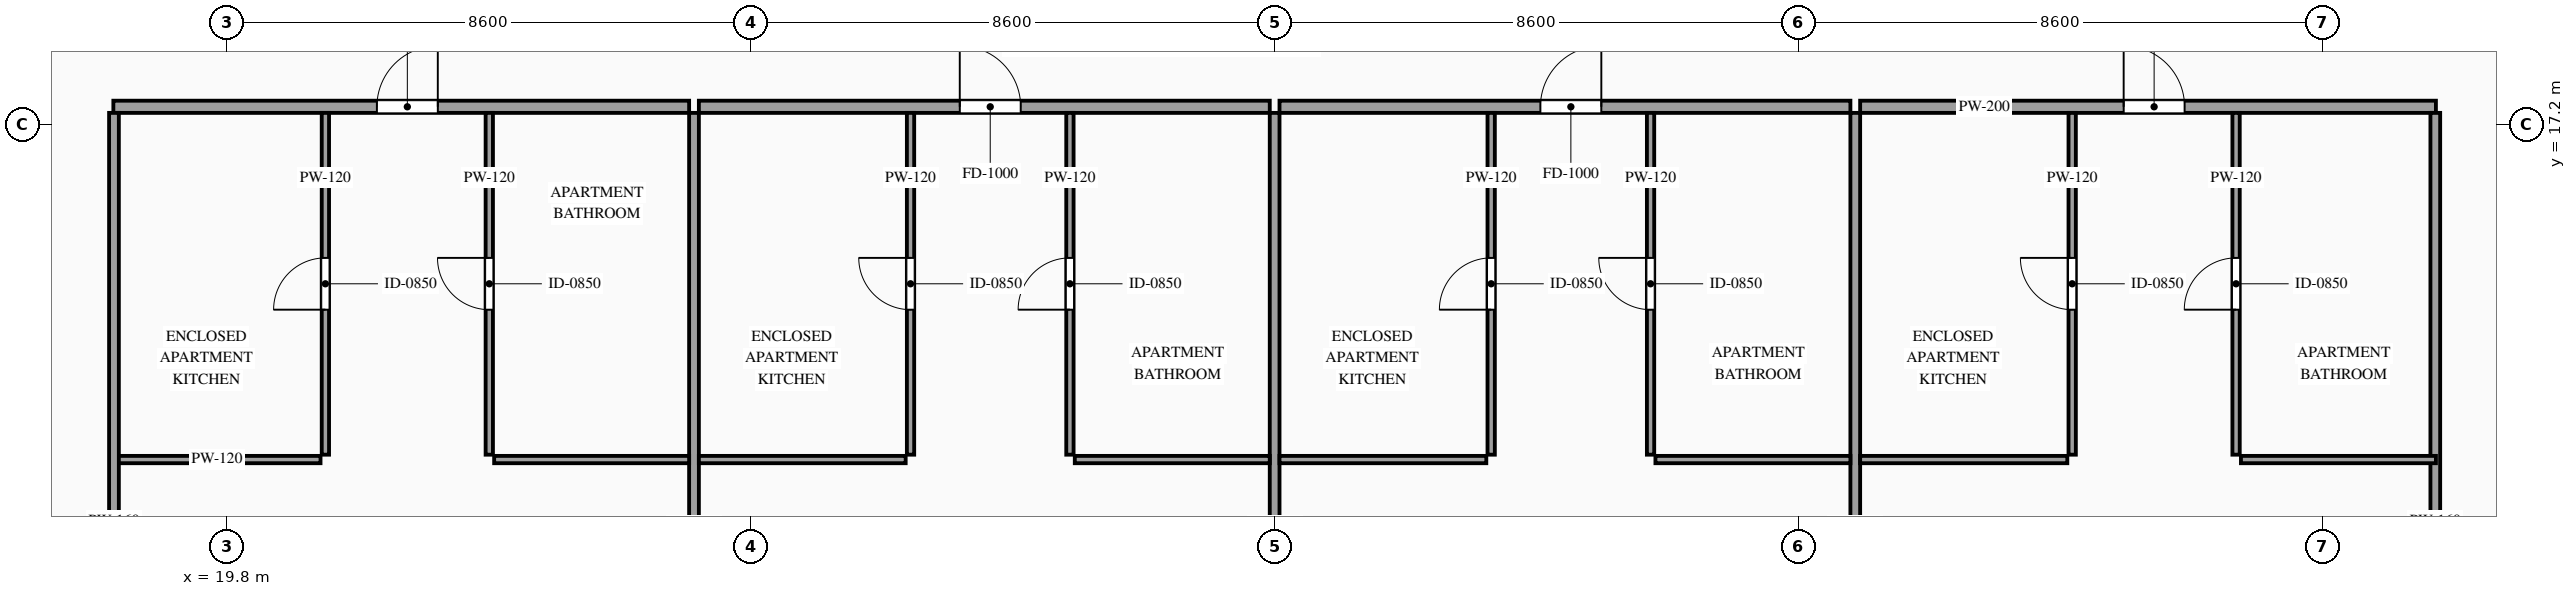
"""IFC4 building model, lengths in metres.
Left out: names, types, materials, properties, quantities, classifications, styles, units other than length and angle.
Written with IfcOpenShell. Run it as: python <this file> out.ifc"""

import sys

from ifc_helpers import new_model, si_unit, direction, frame, frame_2d, origin, place, context, subcontext, project, spatial, rectangle, extrude, source, transform, mapped, element, fill, save


model = new_model("IFC4")
c1 = context("Model", 3, precision=1e-05, world=origin(), true_north=direction((0.0, 1.0)))
c2 = subcontext(c1, "Body", "Model", "MODEL_VIEW")
j1 = project(units=[si_unit("LENGTHUNIT", "METRE"), si_unit("PLANEANGLEUNIT", "RADIAN")], contexts=[c1])
p1 = place(None, origin())
s1 = spatial("IfcSite", under=j1, at=p1, CompositionType="ELEMENT")
p2 = place(p1, origin())
s2 = spatial("IfcBuilding", under=s1, at=p2, CompositionType="ELEMENT")
p3 = place(p2, frame((0.0, 0.0, 188.0)))
s3 = spatial("IfcBuildingStorey", under=s2, at=p3, CompositionType="ELEMENT", Elevation=188.0)
p4 = place(p3, frame((17.94, 17.49, 0.0), z_axis=(0.0, 0.0, 1.0), x_axis=(1.0, 0.0, 0.0)))
e1 = element("IfcWall", 1, at=p4, inside=s3, PredefinedType="PARTITIONING", context=c2, shape_type="SweptSolid", body=[
    extrude(rectangle(XDim=9.45, YDim=0.2, at=frame_2d((4.725, 0.0))), origin(), (0.0, 0.0, 1.0), 3.28),
])
p5 = place(p4, frame((4.325, 0.0, 0.0)))
e2 = element("IfcOpeningElement", 2, at=p5, cuts=e1, PredefinedType="OPENING", context=c2, shape_type="SweptSolid", body=[
    extrude(rectangle(XDim=1.0, YDim=2.2, at=frame_2d((0.5, 1.1))), frame((0.0, 0.115, 0.0), z_axis=(0.0, -1.0, 0.0), x_axis=(1.0, 0.0, 0.0)), (0.0, 0.0, 1.0), 0.23),
])
m1 = source(origin(), c2, "Body", "SweptSolid", [
    extrude(rectangle(XDim=13.54, YDim=0.16, at=frame_2d((6.77, 0.0))), origin(), (0.0, 0.0, 1.0), 3.28),
])
p6 = place(p3, frame((27.47, 3.85, 0.0), z_axis=(0.0, 0.0, 1.0), x_axis=(0.0, 1.0, 0.0)))
e3 = element("IfcWall", 3, at=p6, inside=s3, PredefinedType="PARTITIONING", context=c2, shape_type="MappedRepresentation", body=[
    mapped(m1, transform((0.0, 0.0, 0.0), scale=1.0)),
])
m2 = source(origin(), c2, "Body", "SweptSolid", [
    extrude(rectangle(XDim=3.4, YDim=0.12, at=frame_2d((1.7, 0.0))), origin(), (0.0, 0.0, 1.0), 3.28),
])
p7 = place(p3, frame((17.94, 11.7, 0.0), z_axis=(0.0, 0.0, 1.0), x_axis=(1.0, 0.0, 0.0)))
e4 = element("IfcWall", 4, at=p7, inside=s3, PredefinedType="PARTITIONING", context=c2, shape_type="MappedRepresentation", body=[
    mapped(m2, transform((0.0, 0.0, 0.0), scale=1.0)),
])
p8 = place(p3, frame((21.42, 11.78, 0.0), z_axis=(0.0, 0.0, 1.0), x_axis=(0.0, 1.0, 0.0)))
e5 = element("IfcWall", 5, at=p8, inside=s3, PredefinedType="PARTITIONING", context=c2, shape_type="SweptSolid", body=[
    extrude(rectangle(XDim=5.61, YDim=0.12, at=frame_2d((2.805, 0.0))), origin(), (0.0, 0.0, 1.0), 3.28),
])
p9 = place(p8, frame((2.38, 0.0, 0.0)))
e6 = element("IfcOpeningElement", 6, at=p9, cuts=e5, PredefinedType="OPENING", context=c2, shape_type="SweptSolid", body=[
    extrude(rectangle(XDim=0.85, YDim=2.1, at=frame_2d((0.425, 1.05))), frame((0.0, 0.075, 0.0), z_axis=(0.0, -1.0, 0.0), x_axis=(1.0, 0.0, 0.0)), (0.0, 0.0, 1.0), 0.15),
])
m3 = source(origin(), c2, "Body", "SweptSolid", [
    extrude(rectangle(XDim=3.2, YDim=0.12, at=frame_2d((1.6, 0.0))), origin(), (0.0, 0.0, 1.0), 2.875),
])
p10 = place(p3, frame((24.19, 11.7, 0.0), z_axis=(0.0, 0.0, 1.0), x_axis=(1.0, 0.0, 0.0)))
e7 = element("IfcWall", 7, at=p10, inside=s3, PredefinedType="PARTITIONING", context=c2, shape_type="MappedRepresentation", body=[
    mapped(m3, transform((0.0, 0.0, 0.0), scale=1.0)),
])
p11 = place(p3, frame((24.11, 11.78, 0.0), z_axis=(0.0, 0.0, 1.0), x_axis=(0.0, 1.0, 0.0)))
e8 = element("IfcWall", 8, at=p11, inside=s3, PredefinedType="PARTITIONING", context=c2, shape_type="SweptSolid", body=[
    extrude(rectangle(XDim=5.61, YDim=0.12, at=frame_2d((2.805, 0.0))), origin(), (0.0, 0.0, 1.0), 3.28),
])
p12 = place(p11, frame((2.38, 0.0, 0.0)))
e9 = element("IfcOpeningElement", 9, at=p12, cuts=e8, PredefinedType="OPENING", context=c2, shape_type="SweptSolid", body=[
    extrude(rectangle(XDim=0.85, YDim=2.1, at=frame_2d((0.425, 1.05))), frame((0.0, 0.075, 0.0), z_axis=(0.0, -1.0, 0.0), x_axis=(1.0, 0.0, 0.0)), (0.0, 0.0, 1.0), 0.15),
])
p13 = place(p3, frame((27.55, 17.49, 0.0), z_axis=(0.0, 0.0, 1.0), x_axis=(1.0, 0.0, 0.0)))
e10 = element("IfcWall", 10, at=p13, inside=s3, PredefinedType="PARTITIONING", context=c2, shape_type="SweptSolid", body=[
    extrude(rectangle(XDim=9.37, YDim=0.2, at=frame_2d((4.685, 0.0))), origin(), (0.0, 0.0, 1.0), 3.28),
])
p14 = place(p13, frame((4.282, 0.0, 0.0)))
e11 = element("IfcOpeningElement", 11, at=p14, cuts=e10, PredefinedType="OPENING", context=c2, shape_type="SweptSolid", body=[
    extrude(rectangle(XDim=1.0, YDim=2.2, at=frame_2d((0.5, 1.1))), frame((0.0, 0.115, 0.0), z_axis=(0.0, -1.0, 0.0), x_axis=(1.0, 0.0, 0.0)), (0.0, 0.0, 1.0), 0.23),
])
m4 = source(origin(), c2, "Body", "SweptSolid", [
    extrude(rectangle(XDim=13.54, YDim=0.16, at=frame_2d((6.77, 0.0))), origin(), (0.0, 0.0, 1.0), 2.687),
])
p15 = place(p3, frame((37.0, 3.85, 0.0), z_axis=(0.0, 0.0, 1.0), x_axis=(0.0, 1.0, 0.0)))
e12 = element("IfcWall", 12, at=p15, inside=s3, PredefinedType="PARTITIONING", context=c2, shape_type="MappedRepresentation", body=[
    mapped(m4, transform((0.0, 0.0, 0.0), scale=1.0)),
])
m5 = source(origin(), c2, "Body", "SweptSolid", [
    extrude(rectangle(XDim=3.394, YDim=0.12, at=frame_2d((1.697, 0.0))), origin(), (0.0, 0.0, 1.0), 2.875),
])
p16 = place(p3, frame((27.55, 11.7, 0.0), z_axis=(0.0, 0.0, 1.0), x_axis=(1.0, 0.0, 0.0)))
e13 = element("IfcWall", 13, at=p16, inside=s3, PredefinedType="PARTITIONING", context=c2, shape_type="MappedRepresentation", body=[
    mapped(m5, transform((0.0, 0.0, 0.0), scale=1.0)),
])
p17 = place(p3, frame((31.024, 11.78, 0.0), z_axis=(0.0, 0.0, 1.0), x_axis=(0.0, 1.0, 0.0)))
e14 = element("IfcWall", 14, at=p17, inside=s3, PredefinedType="PARTITIONING", context=c2, shape_type="SweptSolid", body=[
    extrude(rectangle(XDim=5.61, YDim=0.12, at=frame_2d((2.805, 0.0))), origin(), (0.0, 0.0, 1.0), 3.28),
])
p18 = place(p17, frame((2.38, 0.0, 0.0)))
e15 = element("IfcOpeningElement", 15, at=p18, cuts=e14, PredefinedType="OPENING", context=c2, shape_type="SweptSolid", body=[
    extrude(rectangle(XDim=0.85, YDim=2.1, at=frame_2d((0.425, 1.05))), frame((0.0, 0.075, 0.0), z_axis=(0.0, -1.0, 0.0), x_axis=(1.0, 0.0, 0.0)), (0.0, 0.0, 1.0), 0.15),
])
p19 = place(p3, frame((33.72, 11.7, 0.0), z_axis=(0.0, 0.0, 1.0), x_axis=(1.0, 0.0, 0.0)))
e16 = element("IfcWall", 16, at=p19, inside=s3, PredefinedType="PARTITIONING", context=c2, shape_type="MappedRepresentation", body=[
    mapped(m3, transform((0.0, 0.0, 0.0), scale=1.0)),
])
p20 = place(p3, frame((33.64, 11.78, 0.0), z_axis=(0.0, 0.0, 1.0), x_axis=(0.0, 1.0, 0.0)))
e17 = element("IfcWall", 17, at=p20, inside=s3, PredefinedType="PARTITIONING", context=c2, shape_type="SweptSolid", body=[
    extrude(rectangle(XDim=5.61, YDim=0.12, at=frame_2d((2.805, 0.0))), origin(), (0.0, 0.0, 1.0), 3.28),
])
p21 = place(p20, frame((2.38, 0.0, 0.0)))
e18 = element("IfcOpeningElement", 18, at=p21, cuts=e17, PredefinedType="OPENING", context=c2, shape_type="SweptSolid", body=[
    extrude(rectangle(XDim=0.85, YDim=2.1, at=frame_2d((0.425, 1.05))), frame((0.0, 0.075, 0.0), z_axis=(0.0, -1.0, 0.0), x_axis=(1.0, 0.0, 0.0)), (0.0, 0.0, 1.0), 0.15),
])
p22 = place(p3, frame((37.08, 17.49, 0.0), z_axis=(0.0, 0.0, 1.0), x_axis=(1.0, 0.0, 0.0)))
e19 = element("IfcWall", 19, at=p22, inside=s3, PredefinedType="PARTITIONING", context=c2, shape_type="SweptSolid", body=[
    extrude(rectangle(XDim=9.37, YDim=0.2, at=frame_2d((4.685, 0.0))), origin(), (0.0, 0.0, 1.0), 3.28),
])
p23 = place(p22, frame((4.282, 0.0, 0.0)))
e20 = element("IfcOpeningElement", 20, at=p23, cuts=e19, PredefinedType="OPENING", context=c2, shape_type="SweptSolid", body=[
    extrude(rectangle(XDim=1.0, YDim=2.2, at=frame_2d((0.5, 1.1))), frame((0.0, 0.115, 0.0), z_axis=(0.0, -1.0, 0.0), x_axis=(1.0, 0.0, 0.0)), (0.0, 0.0, 1.0), 0.23),
])
p24 = place(p3, frame((46.53, 3.85, 0.0), z_axis=(0.0, 0.0, 1.0), x_axis=(0.0, 1.0, 0.0)))
e21 = element("IfcWall", 21, at=p24, inside=s3, PredefinedType="PARTITIONING", context=c2, shape_type="MappedRepresentation", body=[
    mapped(m1, transform((0.0, 0.0, 0.0), scale=1.0)),
])
p25 = place(p3, frame((37.08, 11.7, 0.0), z_axis=(0.0, 0.0, 1.0), x_axis=(1.0, 0.0, 0.0)))
e22 = element("IfcWall", 22, at=p25, inside=s3, PredefinedType="PARTITIONING", context=c2, shape_type="MappedRepresentation", body=[
    mapped(m5, transform((0.0, 0.0, 0.0), scale=1.0)),
])
p26 = place(p3, frame((40.554, 11.78, 0.0), z_axis=(0.0, 0.0, 1.0), x_axis=(0.0, 1.0, 0.0)))
e23 = element("IfcWall", 23, at=p26, inside=s3, PredefinedType="PARTITIONING", context=c2, shape_type="SweptSolid", body=[
    extrude(rectangle(XDim=5.61, YDim=0.12, at=frame_2d((2.805, 0.0))), origin(), (0.0, 0.0, 1.0), 3.28),
])
p27 = place(p26, frame((2.38, 0.0, 0.0)))
e24 = element("IfcOpeningElement", 24, at=p27, cuts=e23, PredefinedType="OPENING", context=c2, shape_type="SweptSolid", body=[
    extrude(rectangle(XDim=0.85, YDim=2.1, at=frame_2d((0.425, 1.05))), frame((0.0, 0.075, 0.0), z_axis=(0.0, -1.0, 0.0), x_axis=(1.0, 0.0, 0.0)), (0.0, 0.0, 1.0), 0.15),
])
p28 = place(p3, frame((43.25, 11.7, 0.0), z_axis=(0.0, 0.0, 1.0), x_axis=(1.0, 0.0, 0.0)))
e25 = element("IfcWall", 25, at=p28, inside=s3, PredefinedType="PARTITIONING", context=c2, shape_type="MappedRepresentation", body=[
    mapped(m3, transform((0.0, 0.0, 0.0), scale=1.0)),
])
p29 = place(p3, frame((43.17, 11.78, 0.0), z_axis=(0.0, 0.0, 1.0), x_axis=(0.0, 1.0, 0.0)))
e26 = element("IfcWall", 26, at=p29, inside=s3, PredefinedType="PARTITIONING", context=c2, shape_type="SweptSolid", body=[
    extrude(rectangle(XDim=5.61, YDim=0.12, at=frame_2d((2.805, 0.0))), origin(), (0.0, 0.0, 1.0), 3.28),
])
p30 = place(p29, frame((2.38, 0.0, 0.0)))
e27 = element("IfcOpeningElement", 27, at=p30, cuts=e26, PredefinedType="OPENING", context=c2, shape_type="SweptSolid", body=[
    extrude(rectangle(XDim=0.85, YDim=2.1, at=frame_2d((0.425, 1.05))), frame((0.0, 0.075, 0.0), z_axis=(0.0, -1.0, 0.0), x_axis=(1.0, 0.0, 0.0)), (0.0, 0.0, 1.0), 0.15),
])
p31 = place(p3, frame((46.61, 17.49, 0.0), z_axis=(0.0, 0.0, 1.0), x_axis=(1.0, 0.0, 0.0)))
e28 = element("IfcWall", 28, at=p31, inside=s3, PredefinedType="PARTITIONING", context=c2, shape_type="SweptSolid", body=[
    extrude(rectangle(XDim=9.45, YDim=0.2, at=frame_2d((4.725, 0.0))), origin(), (0.0, 0.0, 1.0), 3.28),
])
p32 = place(p31, frame((4.325, 0.0, 0.0)))
e29 = element("IfcOpeningElement", 29, at=p32, cuts=e28, PredefinedType="OPENING", context=c2, shape_type="SweptSolid", body=[
    extrude(rectangle(XDim=1.0, YDim=2.2, at=frame_2d((0.5, 1.1))), frame((0.0, 0.115, 0.0), z_axis=(0.0, -1.0, 0.0), x_axis=(1.0, 0.0, 0.0)), (0.0, 0.0, 1.0), 0.23),
])
m6 = source(origin(), c2, "Body", "SweptSolid", [
    extrude(rectangle(XDim=13.39, YDim=0.16, at=frame_2d((6.695, 0.0))), origin(), (0.0, 0.0, 1.0), 3.28),
])
for number, where, z_axis, x_axis in (
    (30, (17.95, 4.0, 0.0), (0.0, 0.0, 1.0), (0.0, 1.0, 0.0)),
    (31, (56.05, 4.0, 0.0), (0.0, 0.0, 1.0), (0.0, 1.0, 0.0)),
):
    element("IfcWall", number, at=place(p3, frame(where, z_axis=z_axis, x_axis=x_axis)), inside=s3, PredefinedType="PARTITIONING", context=c2, shape_type="MappedRepresentation", body=[
        mapped(m6, transform((0.0, 0.0, 0.0), scale=1.0)),
    ])
m7 = source(origin(), c2, "Body", "SweptSolid", [
    extrude(rectangle(XDim=3.4, YDim=0.12, at=frame_2d((1.7, 0.0))), origin(), (0.0, 0.0, 1.0), 2.875),
])
p33 = place(p3, frame((46.61, 11.7, 0.0), z_axis=(0.0, 0.0, 1.0), x_axis=(1.0, 0.0, 0.0)))
e32 = element("IfcWall", 32, at=p33, inside=s3, PredefinedType="PARTITIONING", context=c2, shape_type="MappedRepresentation", body=[
    mapped(m7, transform((0.0, 0.0, 0.0), scale=1.0)),
])
p34 = place(p3, frame((50.09, 11.78, 0.0), z_axis=(0.0, 0.0, 1.0), x_axis=(0.0, 1.0, 0.0)))
e33 = element("IfcWall", 33, at=p34, inside=s3, PredefinedType="PARTITIONING", context=c2, shape_type="SweptSolid", body=[
    extrude(rectangle(XDim=5.61, YDim=0.12, at=frame_2d((2.805, 0.0))), origin(), (0.0, 0.0, 1.0), 2.775),
])
p35 = place(p34, frame((2.38, 0.0, 0.0)))
e34 = element("IfcOpeningElement", 34, at=p35, cuts=e33, PredefinedType="OPENING", context=c2, shape_type="SweptSolid", body=[
    extrude(rectangle(XDim=0.85, YDim=2.1, at=frame_2d((0.425, 1.05))), frame((0.0, 0.075, 0.0), z_axis=(0.0, -1.0, 0.0), x_axis=(1.0, 0.0, 0.0)), (0.0, 0.0, 1.0), 0.15),
])
m8 = source(origin(), c2, "Body", "SweptSolid", [
    extrude(rectangle(XDim=3.2, YDim=0.12, at=frame_2d((1.6, 0.0))), origin(), (0.0, 0.0, 1.0), 3.28),
])
p36 = place(p3, frame((52.86, 11.7, 0.0), z_axis=(0.0, 0.0, 1.0), x_axis=(1.0, 0.0, 0.0)))
e35 = element("IfcWall", 35, at=p36, inside=s3, PredefinedType="PARTITIONING", context=c2, shape_type="MappedRepresentation", body=[
    mapped(m8, transform((0.0, 0.0, 0.0), scale=1.0)),
])
p37 = place(p3, frame((52.78, 11.78, 0.0), z_axis=(0.0, 0.0, 1.0), x_axis=(0.0, 1.0, 0.0)))
e36 = element("IfcWall", 36, at=p37, inside=s3, PredefinedType="PARTITIONING", context=c2, shape_type="SweptSolid", body=[
    extrude(rectangle(XDim=5.61, YDim=0.12, at=frame_2d((2.805, 0.0))), origin(), (0.0, 0.0, 1.0), 3.28),
])
p38 = place(p37, frame((2.38, 0.0, 0.0)))
e37 = element("IfcOpeningElement", 37, at=p38, cuts=e36, PredefinedType="OPENING", context=c2, shape_type="SweptSolid", body=[
    extrude(rectangle(XDim=0.85, YDim=2.1, at=frame_2d((0.425, 1.05))), frame((0.0, 0.075, 0.0), z_axis=(0.0, -1.0, 0.0), x_axis=(1.0, 0.0, 0.0)), (0.0, 0.0, 1.0), 0.15),
])
m9 = source(origin(), c2, "Body", "SweptSolid", [
    extrude(rectangle(XDim=1.0, YDim=2.2, at=frame_2d((0.5, 1.1))), frame((0.0, 0.025, 0.0), z_axis=(0.0, -1.0, 0.0), x_axis=(1.0, 0.0, 0.0)), (0.0, 0.0, 1.0), 0.05),
])
p39 = place(p5, origin())
e38 = element("IfcDoor", 38, at=p39, inside=s3, OperationType="SINGLE_SWING_RIGHT", PredefinedType="DOOR", context=c2, shape_type="MappedRepresentation", body=[
    mapped(m9, transform((0.0, 0.0, 0.0), scale=1.0)),
])
fill(e2, e38)
m10 = source(origin(), c2, "Body", "SweptSolid", [
    extrude(rectangle(XDim=0.85, YDim=2.1, at=frame_2d((0.425, 1.05))), frame((0.0, 0.025, 0.0), z_axis=(0.0, -1.0, 0.0), x_axis=(1.0, 0.0, 0.0)), (0.0, 0.0, 1.0), 0.05),
])
p40 = place(p9, origin())
e39 = element("IfcDoor", 39, at=p40, inside=s3, OperationType="SINGLE_SWING_LEFT", PredefinedType="DOOR", context=c2, shape_type="MappedRepresentation", body=[
    mapped(m10, transform((0.0, 0.0, 0.0), scale=1.0)),
])
fill(e6, e39)
p41 = place(p12, origin())
e40 = element("IfcDoor", 40, at=p41, inside=s3, OperationType="SINGLE_SWING_RIGHT", PredefinedType="DOOR", context=c2, shape_type="MappedRepresentation", body=[
    mapped(m10, transform((0.0, 0.0, 0.0), scale=1.0)),
])
fill(e9, e40)
p42 = place(p14, origin())
e41 = element("IfcDoor", 41, at=p42, inside=s3, OperationType="SINGLE_SWING_LEFT", PredefinedType="DOOR", context=c2, shape_type="MappedRepresentation", body=[
    mapped(m9, transform((0.0, 0.0, 0.0), scale=1.0)),
])
fill(e11, e41)
p43 = place(p18, origin())
e42 = element("IfcDoor", 42, at=p43, inside=s3, OperationType="SINGLE_SWING_RIGHT", PredefinedType="DOOR", context=c2, shape_type="MappedRepresentation", body=[
    mapped(m10, transform((0.0, 0.0, 0.0), scale=1.0)),
])
fill(e15, e42)
p44 = place(p21, origin())
e43 = element("IfcDoor", 43, at=p44, inside=s3, OperationType="SINGLE_SWING_LEFT", PredefinedType="DOOR", context=c2, shape_type="MappedRepresentation", body=[
    mapped(m10, transform((0.0, 0.0, 0.0), scale=1.0)),
])
fill(e18, e43)
p45 = place(p23, origin())
e44 = element("IfcDoor", 44, at=p45, inside=s3, OperationType="SINGLE_SWING_RIGHT", PredefinedType="DOOR", context=c2, shape_type="MappedRepresentation", body=[
    mapped(m9, transform((0.0, 0.0, 0.0), scale=1.0)),
])
fill(e20, e44)
p46 = place(p27, origin())
e45 = element("IfcDoor", 45, at=p46, inside=s3, OperationType="SINGLE_SWING_LEFT", PredefinedType="DOOR", context=c2, shape_type="MappedRepresentation", body=[
    mapped(m10, transform((0.0, 0.0, 0.0), scale=1.0)),
])
fill(e24, e45)
p47 = place(p30, origin())
e46 = element("IfcDoor", 46, at=p47, inside=s3, OperationType="SINGLE_SWING_RIGHT", PredefinedType="DOOR", context=c2, shape_type="MappedRepresentation", body=[
    mapped(m10, transform((0.0, 0.0, 0.0), scale=1.0)),
])
fill(e27, e46)
p48 = place(p32, origin())
e47 = element("IfcDoor", 47, at=p48, inside=s3, OperationType="SINGLE_SWING_LEFT", PredefinedType="DOOR", context=c2, shape_type="MappedRepresentation", body=[
    mapped(m9, transform((0.0, 0.0, 0.0), scale=1.0)),
])
fill(e29, e47)
p49 = place(p35, origin())
e48 = element("IfcDoor", 48, at=p49, inside=s3, OperationType="SINGLE_SWING_RIGHT", PredefinedType="DOOR", context=c2, shape_type="MappedRepresentation", body=[
    mapped(m10, transform((0.0, 0.0, 0.0), scale=1.0)),
])
fill(e34, e48)
p50 = place(p38, origin())
e49 = element("IfcDoor", 49, at=p50, inside=s3, OperationType="SINGLE_SWING_LEFT", PredefinedType="DOOR", context=c2, shape_type="MappedRepresentation", body=[
    mapped(m10, transform((0.0, 0.0, 0.0), scale=1.0)),
])
fill(e37, e49)
save(model, sys.argv[1])
